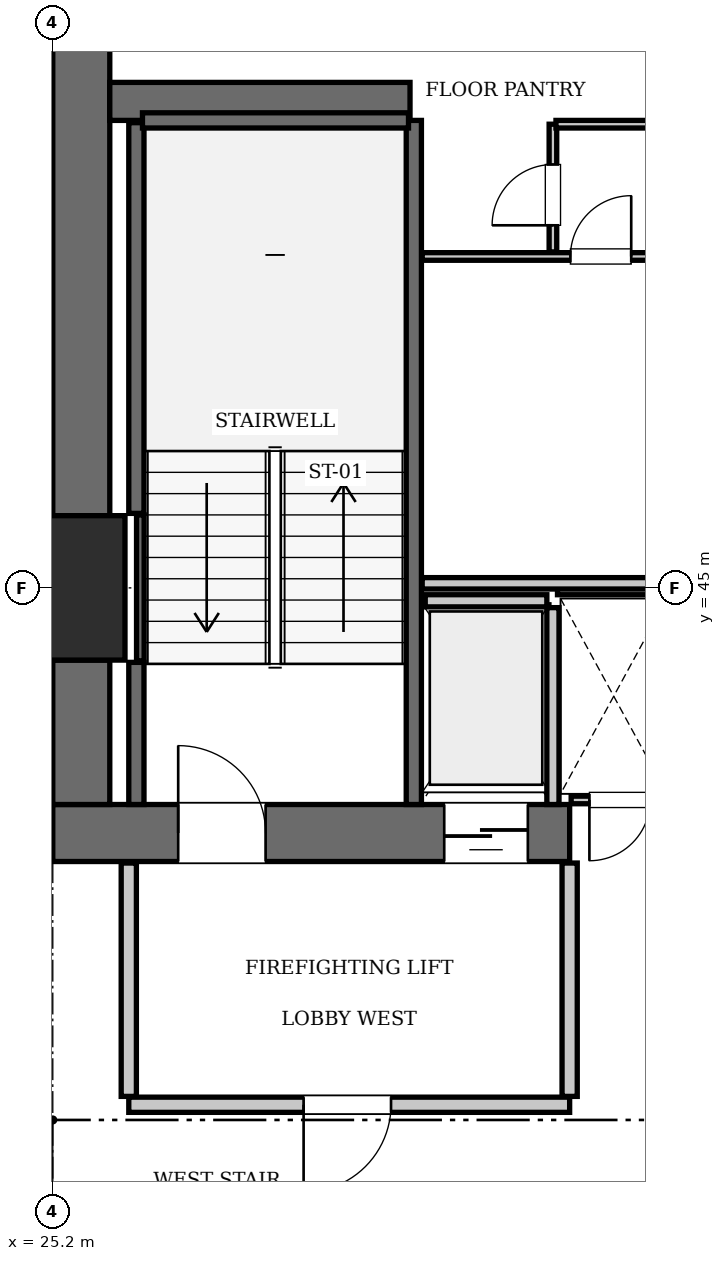
"""IFC4 building model, lengths in metres.
Left out: names, types, materials, properties, quantities, classifications, styles, units other than length and angle.
Written with IfcOpenShell. Run it as: python <this file> out.ifc"""

import sys

from ifc_helpers import new_model, si_unit, direction, frame, frame_2d, origin, origin_2d, place, context, subcontext, project, spatial, rectangle, extrude, element, fill, save


model = new_model("IFC4")
c1 = context("Model", 3, precision=1e-05, world=origin(), true_north=direction((0.0, 1.0)))
c2 = subcontext(c1, "Body", "Model", "MODEL_VIEW")
j1 = project(units=[si_unit("LENGTHUNIT", "METRE"), si_unit("PLANEANGLEUNIT", "RADIAN")], contexts=[c1])
p1 = place(None, origin())
s1 = spatial("IfcSite", under=j1, at=p1, CompositionType="ELEMENT")
p2 = place(p1, origin())
s2 = spatial("IfcBuilding", under=s1, at=p2, CompositionType="ELEMENT")
p3 = place(p2, frame((0.0, 0.0, 223.65)))
s3 = spatial("IfcBuildingStorey", under=s2, at=p3, CompositionType="ELEMENT", Elevation=223.65)
p4 = place(p3, frame((25.2, 45.0, 0.0), z_axis=(0.0, 0.0, 1.0), x_axis=(1.0, 0.0, 0.0)))
e1 = element("IfcColumn", 1, at=p4, inside=s3, PredefinedType="COLUMN", context=c2, shape_type="SweptSolid", body=[
    extrude(rectangle(XDim=1.9, YDim=1.9, at=origin_2d()), origin(), (0.0, 0.0, 1.0), 3.85),
])
p5 = place(p3, frame((25.2, 41.775, 0.0), z_axis=(0.0, 0.0, 1.0), x_axis=(1.0, 0.0, 0.0)))
e2 = element("IfcWall", 2, at=p5, inside=s3, PredefinedType="SHEAR", context=c2, shape_type="SweptSolid", body=[
    extrude(rectangle(XDim=6.8, YDim=0.75, at=frame_2d((3.4, 0.0))), origin(), (0.0, 0.0, 1.0), 3.85),
])
p6 = place(p5, frame((1.65, 0.0, 0.0)))
e3 = element("IfcOpeningElement", 3, at=p6, cuts=e2, PredefinedType="OPENING", context=c2, shape_type="SweptSolid", body=[
    extrude(rectangle(XDim=1.15, YDim=2.15, at=frame_2d((0.575, 1.075))), frame((0.0, 0.385, 0.0), z_axis=(0.0, -1.0, 0.0), x_axis=(1.0, 0.0, 0.0)), (0.0, 0.0, 1.0), 0.77),
])
p7 = place(p5, frame((5.15, 0.0, 0.0)))
e4 = element("IfcOpeningElement", 4, at=p7, cuts=e2, PredefinedType="OPENING", context=c2, shape_type="SweptSolid", body=[
    extrude(rectangle(XDim=1.1, YDim=2.2, at=frame_2d((0.55, 1.1))), frame((0.0, 0.385, 0.0), z_axis=(0.0, -1.0, 0.0), x_axis=(1.0, 0.0, 0.0)), (0.0, 0.0, 1.0), 0.77),
])
p8 = place(p3, frame((25.575, 42.15, 0.0), z_axis=(0.0, 0.0, 1.0), x_axis=(0.0, 1.0, 0.0)))
e5 = element("IfcWall", 5, at=p8, inside=s3, PredefinedType="SHEAR", context=c2, shape_type="SweptSolid", body=[
    extrude(rectangle(XDim=1.9, YDim=0.75, at=frame_2d((0.95, 0.0))), origin(), (0.0, 0.0, 1.0), 3.85),
])
p9 = place(p3, frame((25.575, 45.95, 0.0), z_axis=(0.0, 0.0, 1.0), x_axis=(0.0, 1.0, 0.0)))
e6 = element("IfcWall", 6, at=p9, inside=s3, PredefinedType="SHEAR", context=c2, shape_type="SweptSolid", body=[
    extrude(rectangle(XDim=7.3, YDim=0.75, at=frame_2d((3.65, 0.0))), origin(), (0.0, 0.0, 1.0), 3.85),
])
p10 = place(p3, frame((25.95, 51.4, 0.0), z_axis=(0.0, 0.0, 1.0), x_axis=(1.0, 0.0, 0.0)))
e7 = element("IfcWall", 7, at=p10, inside=s3, PredefinedType="SHEAR", context=c2, shape_type="SweptSolid", body=[
    extrude(rectangle(XDim=3.95, YDim=0.5, at=frame_2d((1.975, 0.0))), origin(), (0.0, 0.0, 1.0), 3.85),
])
p11 = place(p3, frame((29.95, 42.15, 0.0), z_axis=(0.0, 0.0, 1.0), x_axis=(0.0, 1.0, 0.0)))
e8 = element("IfcWall", 8, at=p11, inside=s3, PredefinedType="SOLIDWALL", context=c2, shape_type="SweptSolid", body=[
    extrude(rectangle(XDim=9.0, YDim=0.2, at=frame_2d((4.5, 0.0))), origin(), (0.0, 0.0, 1.0), 3.55),
])
p12 = place(p3, frame((26.3, 42.15, 0.0), z_axis=(0.0, 0.0, 1.0), x_axis=(0.0, 1.0, 0.0)))
e9 = element("IfcWall", 9, at=p12, inside=s3, PredefinedType="SOLIDWALL", context=c2, shape_type="SweptSolid", body=[
    extrude(rectangle(XDim=1.87, YDim=0.2, at=frame_2d((0.935, 0.0))), origin(), (0.0, 0.0, 1.0), 3.55),
])
p13 = place(p3, frame((26.3, 45.98, 0.0), z_axis=(0.0, 0.0, 1.0), x_axis=(0.0, 1.0, 0.0)))
e10 = element("IfcWall", 10, at=p13, inside=s3, PredefinedType="SOLIDWALL", context=c2, shape_type="SweptSolid", body=[
    extrude(rectangle(XDim=5.14, YDim=0.2, at=frame_2d((2.57, 0.0))), origin(), (0.0, 0.0, 1.0), 3.55),
])
p14 = place(p3, frame((26.38, 51.15, 0.0), z_axis=(0.0, 0.0, 1.0), x_axis=(1.0, 0.0, 0.0)))
e11 = element("IfcWall", 11, at=p14, inside=s3, PredefinedType="SOLIDWALL", context=c2, shape_type="SweptSolid", body=[
    extrude(rectangle(XDim=3.5, YDim=0.2, at=frame_2d((1.75, 0.0))), origin(), (0.0, 0.0, 1.0), 3.55),
])
p15 = place(p3, frame((26.352, 44.04, 0.0), z_axis=(0.0, 0.0, 1.0), x_axis=(0.0, 1.0, 0.0)))
e12 = element("IfcWall", 12, at=p15, inside=s3, PredefinedType="SOLIDWALL", context=c2, shape_type="SweptSolid", body=[
    extrude(rectangle(XDim=1.92, YDim=0.1, at=frame_2d((0.96, 0.0))), origin(), (0.0, 0.0, 1.0), 3.55),
])
p16 = place(p3, frame((30.1, 44.83, 0.0), z_axis=(0.0, 0.0, 1.0), x_axis=(1.0, 0.0, 0.0)))
e13 = element("IfcWall", 13, at=p16, inside=s3, PredefinedType="SOLIDWALL", context=c2, shape_type="SweptSolid", body=[
    extrude(rectangle(XDim=1.6, YDim=0.16, at=frame_2d((0.8, 0.0))), origin(), (0.0, 0.0, 1.0), 3.55),
])
p17 = place(p3, frame((31.78, 42.15, 0.0), z_axis=(0.0, 0.0, 1.0), x_axis=(0.0, 1.0, 0.0)))
e14 = element("IfcWall", 14, at=p17, inside=s3, PredefinedType="SOLIDWALL", context=c2, shape_type="SweptSolid", body=[
    extrude(rectangle(XDim=2.59, YDim=0.16, at=frame_2d((1.295, 0.0))), origin(), (0.0, 0.0, 1.0), 3.55),
])
p18 = place(p3, frame((26.2, 38.2, 0.0), z_axis=(0.0, 0.0, 1.0), x_axis=(1.0, 0.0, 0.0)))
e15 = element("IfcWall", 15, at=p18, inside=s3, PredefinedType="PARTITIONING", context=c2, shape_type="SweptSolid", body=[
    extrude(rectangle(XDim=5.8, YDim=0.2, at=frame_2d((2.9, 0.0))), origin(), (0.0, 0.0, 1.0), 3.55),
])
p19 = place(p18, frame((2.3, 0.0, 0.0)))
e16 = element("IfcOpeningElement", 16, at=p19, cuts=e15, PredefinedType="OPENING", context=c2, shape_type="SweptSolid", body=[
    extrude(rectangle(XDim=1.15, YDim=2.15, at=frame_2d((0.575, 1.075))), frame((0.0, 0.11, 0.0), z_axis=(0.0, -1.0, 0.0), x_axis=(1.0, 0.0, 0.0)), (0.0, 0.0, 1.0), 0.22),
])
for number, where, z_axis, x_axis in (
    (17, (26.2, 38.31, 0.0), (0.0, 0.0, 1.0), (0.0, 1.0, 0.0)),
    (18, (32.0, 38.31, 0.0), (0.0, 0.0, 1.0), (0.0, 1.0, 0.0)),
):
    element("IfcWall", number, at=place(p3, frame(where, z_axis=z_axis, x_axis=x_axis)), inside=s3, PredefinedType="PARTITIONING", context=c2, shape_type="SweptSolid", body=[
        extrude(rectangle(XDim=3.07, YDim=0.2, at=frame_2d((1.535, 0.0))), origin(), (0.0, 0.0, 1.0), 3.55),
    ])
p20 = place(p3, frame((32.02, 42.21, 0.0), z_axis=(0.0, 0.0, 1.0), x_axis=(1.0, 0.0, 0.0)))
e19 = element("IfcWall", 19, at=p20, inside=s3, PredefinedType="PARTITIONING", context=c2, shape_type="SweptSolid", body=[
    extrude(rectangle(XDim=1.32, YDim=0.1, at=frame_2d((0.66, 0.0))), origin(), (0.0, 0.0, 1.0), 3.55),
])
p21 = place(p20, frame((0.24, 0.0, 0.0)))
e20 = element("IfcOpeningElement", 20, at=p21, cuts=e19, PredefinedType="OPENING", context=c2, shape_type="SweptSolid", body=[
    extrude(rectangle(XDim=0.8, YDim=2.05, at=frame_2d((0.4, 1.025))), frame((0.0, 0.06, 0.0), z_axis=(0.0, -1.0, 0.0), x_axis=(1.0, 0.0, 0.0)), (0.0, 0.0, 1.0), 0.12),
])
p22 = place(p3, frame((31.84, 44.96, 0.0), z_axis=(0.0, 0.0, 1.0), x_axis=(1.0, 0.0, 0.0)))
e21 = element("IfcWall", 21, at=p22, inside=s3, PredefinedType="PARTITIONING", context=c2, shape_type="SweptSolid", body=[
    extrude(rectangle(XDim=1.48, YDim=0.1, at=frame_2d((0.74, 0.0))), origin(), (0.0, 0.0, 1.0), 3.55),
])
p23 = place(p3, frame((30.06, 45.06, 0.0), z_axis=(0.0, 0.0, 1.0), x_axis=(1.0, 0.0, 0.0)))
e22 = element("IfcWall", 22, at=p23, inside=s3, PredefinedType="PARTITIONING", context=c2, shape_type="SweptSolid", body=[
    extrude(rectangle(XDim=3.18, YDim=0.15, at=frame_2d((1.59, 0.0))), origin(), (0.0, 0.0, 1.0), 3.55),
])
p24 = place(p3, frame((30.06, 49.36, 0.0), z_axis=(0.0, 0.0, 1.0), x_axis=(1.0, 0.0, 0.0)))
e23 = element("IfcWall", 23, at=p24, inside=s3, PredefinedType="PARTITIONING", context=c2, shape_type="SweptSolid", body=[
    extrude(rectangle(XDim=3.18, YDim=0.1, at=frame_2d((1.59, 0.0))), origin(), (0.0, 0.0, 1.0), 3.55),
])
p25 = place(p24, frame((1.95, 0.0, 0.0)))
e24 = element("IfcOpeningElement", 24, at=p25, cuts=e23, PredefinedType="OPENING", context=c2, shape_type="SweptSolid", body=[
    extrude(rectangle(XDim=0.8, YDim=2.05, at=frame_2d((0.4, 1.025))), frame((0.0, 0.06, 0.0), z_axis=(0.0, -1.0, 0.0), x_axis=(1.0, 0.0, 0.0)), (0.0, 0.0, 1.0), 0.12),
])
p26 = place(p3, frame((31.78, 49.42, 0.0), z_axis=(0.0, 0.0, 1.0), x_axis=(0.0, 1.0, 0.0)))
e25 = element("IfcWall", 25, at=p26, inside=s3, PredefinedType="PARTITIONING", context=c2, shape_type="SweptSolid", body=[
    extrude(rectangle(XDim=1.68, YDim=0.1, at=frame_2d((0.84, 0.0))), origin(), (0.0, 0.0, 1.0), 3.55),
])
p27 = place(p26, frame((0.35, 0.0, 0.0)))
e26 = element("IfcOpeningElement", 26, at=p27, cuts=e25, PredefinedType="OPENING", context=c2, shape_type="SweptSolid", body=[
    extrude(rectangle(XDim=0.8, YDim=2.05, at=frame_2d((0.4, 1.025))), frame((0.0, 0.06, 0.0), z_axis=(0.0, -1.0, 0.0), x_axis=(1.0, 0.0, 0.0)), (0.0, 0.0, 1.0), 0.12),
])
p28 = place(p3, frame((31.82, 51.1, 0.0), z_axis=(0.0, 0.0, 1.0), x_axis=(1.0, 0.0, 0.0)))
e27 = element("IfcWall", 27, at=p28, inside=s3, PredefinedType="PARTITIONING", context=c2, shape_type="SweptSolid", body=[
    extrude(rectangle(XDim=1.42, YDim=0.1, at=frame_2d((0.71, 0.0))), origin(), (0.0, 0.0, 1.0), 3.55),
])
p29 = place(p6, origin())
e28 = element("IfcDoor", 28, at=p29, inside=s3, OperationType="SINGLE_SWING_LEFT", PredefinedType="DOOR", context=c2, shape_type="SweptSolid", body=[
    extrude(rectangle(XDim=1.15, YDim=2.15, at=frame_2d((0.575, 1.075))), frame((0.0, 0.025, 0.0), z_axis=(0.0, -1.0, 0.0), x_axis=(1.0, 0.0, 0.0)), (0.0, 0.0, 1.0), 0.05),
])
fill(e3, e28)
p30 = place(p7, frame((1.1, 0.0, 0.0), z_axis=(0.0, 0.0, 1.0), x_axis=(-1.0, 0.0, 0.0)))
e29 = element("IfcDoor", 29, at=p30, inside=s3, OperationType="SLIDING_TO_LEFT", PredefinedType="DOOR", context=c2, shape_type="SweptSolid", body=[
    extrude(rectangle(XDim=1.1, YDim=2.2, at=frame_2d((0.55, 1.1))), frame((0.0, 0.025, 0.0), z_axis=(0.0, -1.0, 0.0), x_axis=(1.0, 0.0, 0.0)), (0.0, 0.0, 1.0), 0.05),
])
fill(e4, e29)
p31 = place(p19, frame((1.15, 0.0, 0.0), z_axis=(0.0, 0.0, 1.0), x_axis=(-1.0, 0.0, 0.0)))
e30 = element("IfcDoor", 30, at=p31, inside=s3, OperationType="SINGLE_SWING_RIGHT", PredefinedType="DOOR", context=c2, shape_type="SweptSolid", body=[
    extrude(rectangle(XDim=1.15, YDim=2.15, at=frame_2d((0.575, 1.075))), frame((0.0, 0.025, 0.0), z_axis=(0.0, -1.0, 0.0), x_axis=(1.0, 0.0, 0.0)), (0.0, 0.0, 1.0), 0.05),
])
fill(e16, e30)
p32 = place(p21, frame((0.8, 0.0, 0.0), z_axis=(0.0, 0.0, 1.0), x_axis=(-1.0, 0.0, 0.0)))
e31 = element("IfcDoor", 31, at=p32, inside=s3, OperationType="SINGLE_SWING_RIGHT", PredefinedType="DOOR", context=c2, shape_type="SweptSolid", body=[
    extrude(rectangle(XDim=0.8, YDim=2.05, at=frame_2d((0.4, 1.025))), frame((0.0, 0.025, 0.0), z_axis=(0.0, -1.0, 0.0), x_axis=(1.0, 0.0, 0.0)), (0.0, 0.0, 1.0), 0.05),
])
fill(e20, e31)
p33 = place(p25, origin())
e32 = element("IfcDoor", 32, at=p33, inside=s3, OperationType="SINGLE_SWING_RIGHT", PredefinedType="DOOR", context=c2, shape_type="SweptSolid", body=[
    extrude(rectangle(XDim=0.8, YDim=2.05, at=frame_2d((0.4, 1.025))), frame((0.0, 0.025, 0.0), z_axis=(0.0, -1.0, 0.0), x_axis=(1.0, 0.0, 0.0)), (0.0, 0.0, 1.0), 0.05),
])
fill(e24, e32)
p34 = place(p27, origin())
e33 = element("IfcDoor", 33, at=p34, inside=s3, OperationType="SINGLE_SWING_LEFT", PredefinedType="DOOR", context=c2, shape_type="SweptSolid", body=[
    extrude(rectangle(XDim=0.8, YDim=2.05, at=frame_2d((0.4, 1.025))), frame((0.0, 0.025, 0.0), z_axis=(0.0, -1.0, 0.0), x_axis=(1.0, 0.0, 0.0)), (0.0, 0.0, 1.0), 0.05),
])
fill(e26, e33)
save(model, sys.argv[1])
